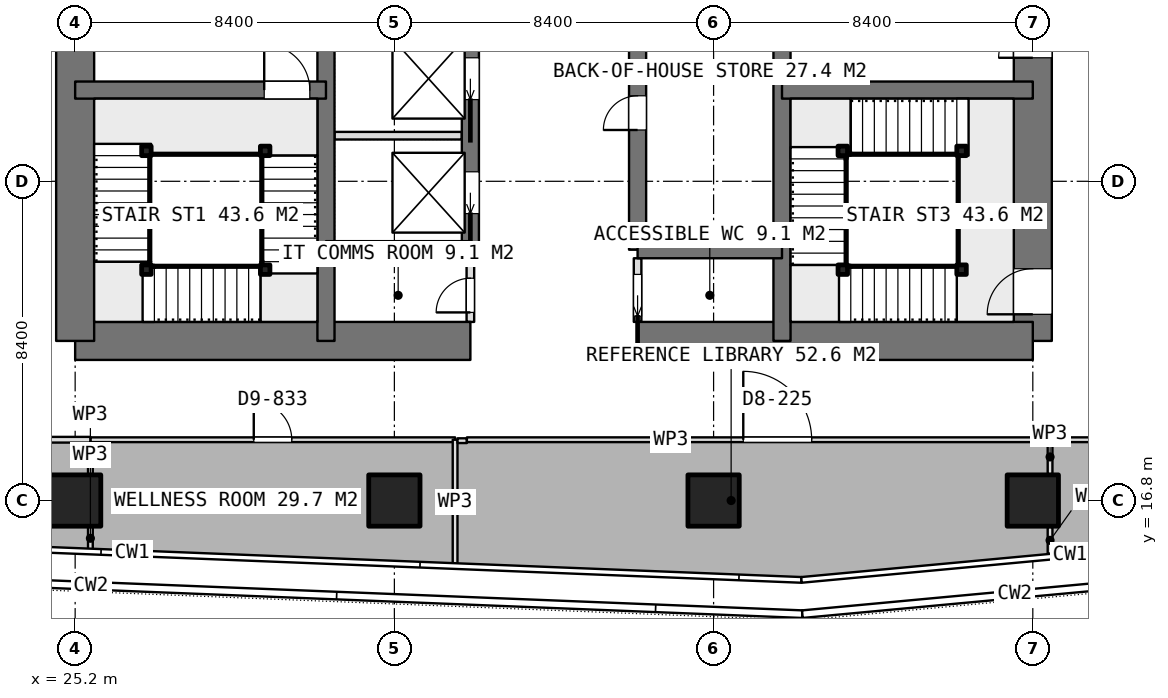
"""IFC4 building model, lengths in metres.
Left out: names, types, materials, properties, quantities, classifications, styles, units other than length and angle.
Written with IfcOpenShell. Run it as: python <this file> out.ifc"""

import sys

from ifc_helpers import new_model, si_unit, direction, frame, frame_2d, origin, origin_2d, place, context, subcontext, project, spatial, rectangle, extrude, element, fill, save


model = new_model("IFC4")
c1 = context("Model", 3, precision=1e-05, world=origin(), true_north=direction((0.0, 1.0)))
c2 = subcontext(c1, "Body", "Model", "MODEL_VIEW")
j1 = project(units=[si_unit("LENGTHUNIT", "METRE"), si_unit("PLANEANGLEUNIT", "RADIAN")], contexts=[c1])
p1 = place(None, origin())
s1 = spatial("IfcSite", under=j1, at=p1, CompositionType="ELEMENT")
p2 = place(p1, origin())
s2 = spatial("IfcBuilding", under=s1, at=p2, CompositionType="ELEMENT")
p3 = place(p2, frame((0.0, 0.0, 206.45)))
s3 = spatial("IfcBuildingStorey", under=s2, at=p3, CompositionType="ELEMENT", Elevation=206.45)
p4 = place(p3, frame((25.2, 21.0, 0.0), z_axis=(0.0, 0.0, 1.0), x_axis=(1.0, 0.0, 0.0)))
e1 = element("IfcWall", 1, at=p4, inside=s3, PredefinedType="SHEAR", context=c2, shape_type="SweptSolid", body=[
    extrude(rectangle(XDim=10.4, YDim=1.0, at=frame_2d((5.2, 0.0))), origin(), (0.0, 0.0, 1.0), 3.75),
])
p5 = place(p3, frame((40.0, 21.0, 0.0), z_axis=(0.0, 0.0, 1.0), x_axis=(1.0, 0.0, 0.0)))
e2 = element("IfcWall", 2, at=p5, inside=s3, PredefinedType="SHEAR", context=c2, shape_type="SweptSolid", body=[
    extrude(rectangle(XDim=10.4, YDim=1.0, at=frame_2d((5.2, 0.0))), origin(), (0.0, 0.0, 1.0), 3.75),
])
p6 = place(p3, frame((25.2, 21.0, 0.0), z_axis=(0.0, 0.0, 1.0), x_axis=(0.0, 1.0, 0.0)))
e3 = element("IfcWall", 3, at=p6, inside=s3, PredefinedType="SHEAR", context=c2, shape_type="SweptSolid", body=[
    extrude(rectangle(XDim=25.2, YDim=1.0, at=frame_2d((12.6, 0.0))), origin(), (0.0, 0.0, 1.0), 3.75),
])
p7 = place(p6, frame((7.8, 0.0, 0.0)))
e4 = element("IfcOpeningElement", 4, at=p7, cuts=e3, PredefinedType="OPENING", context=c2, shape_type="SweptSolid", body=[
    extrude(rectangle(XDim=1.2, YDim=2.1, at=frame_2d((0.6, 1.05))), frame((0.0, 0.51, 0.0), z_axis=(0.0, -1.0, 0.0), x_axis=(1.0, 0.0, 0.0)), (0.0, 0.0, 1.0), 1.02),
])
p8 = place(p6, frame((14.25, 0.0, 0.0)))
e5 = element("IfcOpeningElement", 5, at=p8, cuts=e3, PredefinedType="OPENING", context=c2, shape_type="SweptSolid", body=[
    extrude(rectangle(XDim=0.9, YDim=2.1, at=frame_2d((0.45, 1.05))), frame((0.0, 0.51, 0.0), z_axis=(0.0, -1.0, 0.0), x_axis=(1.0, 0.0, 0.0)), (0.0, 0.0, 1.0), 1.02),
])
p9 = place(p6, frame((16.85, 0.0, 0.0)))
e6 = element("IfcOpeningElement", 6, at=p9, cuts=e3, PredefinedType="OPENING", context=c2, shape_type="SweptSolid", body=[
    extrude(rectangle(XDim=0.9, YDim=2.1, at=frame_2d((0.45, 1.05))), frame((0.0, 0.51, 0.0), z_axis=(0.0, -1.0, 0.0), x_axis=(1.0, 0.0, 0.0)), (0.0, 0.0, 1.0), 1.02),
])
p10 = place(p6, frame((19.025, 0.0, 0.0)))
e7 = element("IfcOpeningElement", 7, at=p10, cuts=e3, PredefinedType="OPENING", context=c2, shape_type="SweptSolid", body=[
    extrude(rectangle(XDim=1.2, YDim=2.1, at=frame_2d((0.6, 1.05))), frame((0.0, 0.51, 0.0), z_axis=(0.0, -1.0, 0.0), x_axis=(1.0, 0.0, 0.0)), (0.0, 0.0, 1.0), 1.02),
])
p11 = place(p3, frame((50.4, 21.0, 0.0), z_axis=(0.0, 0.0, 1.0), x_axis=(0.0, 1.0, 0.0)))
e8 = element("IfcWall", 8, at=p11, inside=s3, PredefinedType="SHEAR", context=c2, shape_type="SweptSolid", body=[
    extrude(rectangle(XDim=25.2, YDim=1.0, at=frame_2d((12.6, 0.0))), origin(), (0.0, 0.0, 1.0), 3.75),
])
p12 = place(p11, frame((16.2, 0.0, 0.0)))
e9 = element("IfcOpeningElement", 9, at=p12, cuts=e8, PredefinedType="OPENING", context=c2, shape_type="SweptSolid", body=[
    extrude(rectangle(XDim=1.2, YDim=2.1, at=frame_2d((0.6, 1.05))), frame((0.0, 0.51, 0.0), z_axis=(0.0, -1.0, 0.0), x_axis=(1.0, 0.0, 0.0)), (0.0, 0.0, 1.0), 1.02),
])
p13 = place(p11, frame((10.05, 0.0, 0.0)))
e10 = element("IfcOpeningElement", 10, at=p13, cuts=e8, PredefinedType="OPENING", context=c2, shape_type="SweptSolid", body=[
    extrude(rectangle(XDim=0.9, YDim=2.1, at=frame_2d((0.45, 1.05))), frame((0.0, 0.51, 0.0), z_axis=(0.0, -1.0, 0.0), x_axis=(1.0, 0.0, 0.0)), (0.0, 0.0, 1.0), 1.02),
])
p14 = place(p11, frame((7.45, 0.0, 0.0)))
e11 = element("IfcOpeningElement", 11, at=p14, cuts=e8, PredefinedType="OPENING", context=c2, shape_type="SweptSolid", body=[
    extrude(rectangle(XDim=0.9, YDim=2.1, at=frame_2d((0.45, 1.05))), frame((0.0, 0.51, 0.0), z_axis=(0.0, -1.0, 0.0), x_axis=(1.0, 0.0, 0.0)), (0.0, 0.0, 1.0), 1.02),
])
p15 = place(p11, frame((0.7, 0.0, 0.0)))
e12 = element("IfcOpeningElement", 12, at=p15, cuts=e8, PredefinedType="OPENING", context=c2, shape_type="SweptSolid", body=[
    extrude(rectangle(XDim=1.2, YDim=2.1, at=frame_2d((0.6, 1.05))), frame((0.0, 0.51, 0.0), z_axis=(0.0, -1.0, 0.0), x_axis=(1.0, 0.0, 0.0)), (0.0, 0.0, 1.0), 1.02),
])
for number, where, z_axis, x_axis in (
    (13, (31.8, 21.0, 0.0), (0.0, 0.0, 1.0), (0.0, 1.0, 0.0)),
    (14, (43.8, 21.0, 0.0), (0.0, 0.0, 1.0), (0.0, 1.0, 0.0)),
):
    element("IfcWall", number, at=place(p3, frame(where, z_axis=z_axis, x_axis=x_axis)), inside=s3, PredefinedType="SHEAR", context=c2, shape_type="SweptSolid", body=[
        extrude(rectangle(XDim=25.2, YDim=0.45, at=frame_2d((12.6, 0.0))), origin(), (0.0, 0.0, 1.0), 3.75),
    ])
p16 = place(p3, frame((35.6, 23.4, 0.0), z_axis=(0.0, 0.0, 1.0), x_axis=(0.0, 1.0, 0.0)))
e15 = element("IfcWall", 15, at=p16, inside=s3, PredefinedType="SHEAR", context=c2, shape_type="SweptSolid", body=[
    extrude(rectangle(XDim=18.0, YDim=0.45, at=frame_2d((9.0, 0.0))), origin(), (0.0, 0.0, 1.0), 3.75),
])
p17 = place(p16, frame((0.95, 0.0, 0.0)))
e16 = element("IfcOpeningElement", 16, at=p17, cuts=e15, PredefinedType="OPENING", context=c2, shape_type="SweptSolid", body=[
    extrude(rectangle(XDim=1.1, YDim=2.1, at=frame_2d((0.55, 1.05))), frame((0.0, 0.235, 0.0), z_axis=(0.0, -1.0, 0.0), x_axis=(1.0, 0.0, 0.0)), (0.0, 0.0, 1.0), 0.47),
])
p18 = place(p16, frame((3.95, 0.0, 0.0)))
e17 = element("IfcOpeningElement", 17, at=p18, cuts=e15, PredefinedType="OPENING", context=c2, shape_type="SweptSolid", body=[
    extrude(rectangle(XDim=1.1, YDim=2.1, at=frame_2d((0.55, 1.05))), frame((0.0, 0.235, 0.0), z_axis=(0.0, -1.0, 0.0), x_axis=(1.0, 0.0, 0.0)), (0.0, 0.0, 1.0), 0.47),
])
p19 = place(p16, frame((6.95, 0.0, 0.0)))
e18 = element("IfcOpeningElement", 18, at=p19, cuts=e15, PredefinedType="OPENING", context=c2, shape_type="SweptSolid", body=[
    extrude(rectangle(XDim=1.1, YDim=2.1, at=frame_2d((0.55, 1.05))), frame((0.0, 0.235, 0.0), z_axis=(0.0, -1.0, 0.0), x_axis=(1.0, 0.0, 0.0)), (0.0, 0.0, 1.0), 0.47),
])
p20 = place(p16, frame((9.95, 0.0, 0.0)))
e19 = element("IfcOpeningElement", 19, at=p20, cuts=e15, PredefinedType="OPENING", context=c2, shape_type="SweptSolid", body=[
    extrude(rectangle(XDim=1.1, YDim=2.1, at=frame_2d((0.55, 1.05))), frame((0.0, 0.235, 0.0), z_axis=(0.0, -1.0, 0.0), x_axis=(1.0, 0.0, 0.0)), (0.0, 0.0, 1.0), 0.47),
])
p21 = place(p16, frame((12.95, 0.0, 0.0)))
e20 = element("IfcOpeningElement", 20, at=p21, cuts=e15, PredefinedType="OPENING", context=c2, shape_type="SweptSolid", body=[
    extrude(rectangle(XDim=1.1, YDim=2.1, at=frame_2d((0.55, 1.05))), frame((0.0, 0.235, 0.0), z_axis=(0.0, -1.0, 0.0), x_axis=(1.0, 0.0, 0.0)), (0.0, 0.0, 1.0), 0.47),
])
p22 = place(p16, frame((15.95, 0.0, 0.0)))
e21 = element("IfcOpeningElement", 21, at=p22, cuts=e15, PredefinedType="OPENING", context=c2, shape_type="SweptSolid", body=[
    extrude(rectangle(XDim=1.1, YDim=2.1, at=frame_2d((0.55, 1.05))), frame((0.0, 0.235, 0.0), z_axis=(0.0, -1.0, 0.0), x_axis=(1.0, 0.0, 0.0)), (0.0, 0.0, 1.0), 0.47),
])
p23 = place(p3, frame((40.0, 23.4, 0.0), z_axis=(0.0, 0.0, 1.0), x_axis=(0.0, 1.0, 0.0)))
e22 = element("IfcWall", 22, at=p23, inside=s3, PredefinedType="SHEAR", context=c2, shape_type="SweptSolid", body=[
    extrude(rectangle(XDim=18.0, YDim=0.45, at=frame_2d((9.0, 0.0))), origin(), (0.0, 0.0, 1.0), 3.75),
])
p24 = place(p23, frame((3.15, 0.0, 0.0)))
e23 = element("IfcOpeningElement", 23, at=p24, cuts=e22, PredefinedType="OPENING", context=c2, shape_type="SweptSolid", body=[
    extrude(rectangle(XDim=0.9, YDim=2.1, at=frame_2d((0.45, 1.05))), frame((0.0, 0.235, 0.0), z_axis=(0.0, -1.0, 0.0), x_axis=(1.0, 0.0, 0.0)), (0.0, 0.0, 1.0), 0.47),
])
p25 = place(p23, frame((9.15, 0.0, 0.0)))
e24 = element("IfcOpeningElement", 24, at=p25, cuts=e22, PredefinedType="OPENING", context=c2, shape_type="SweptSolid", body=[
    extrude(rectangle(XDim=0.9, YDim=2.1, at=frame_2d((0.45, 1.05))), frame((0.0, 0.235, 0.0), z_axis=(0.0, -1.0, 0.0), x_axis=(1.0, 0.0, 0.0)), (0.0, 0.0, 1.0), 0.47),
])
for number, where, z_axis, x_axis in (
    (25, (31.8, 23.4, 0.0), (0.0, 0.0, 1.0), (1.0, 0.0, 0.0)),
    (26, (40.0, 23.4, 0.0), (0.0, 0.0, 1.0), (1.0, 0.0, 0.0)),
):
    element("IfcWall", number, at=place(p3, frame(where, z_axis=z_axis, x_axis=x_axis)), inside=s3, PredefinedType="SHEAR", context=c2, shape_type="SweptSolid", body=[
        extrude(rectangle(XDim=3.8, YDim=0.45, at=frame_2d((1.9, 0.0))), origin(), (0.0, 0.0, 1.0), 3.75),
    ])
p26 = place(p3, frame((25.2, 27.6, 0.0), z_axis=(0.0, 0.0, 1.0), x_axis=(1.0, 0.0, 0.0)))
e27 = element("IfcWall", 27, at=p26, inside=s3, PredefinedType="SHEAR", context=c2, shape_type="SweptSolid", body=[
    extrude(rectangle(XDim=6.6, YDim=0.45, at=frame_2d((3.3, 0.0))), origin(), (0.0, 0.0, 1.0), 3.75),
])
p27 = place(p26, frame((4.975, 0.0, 0.0)))
e28 = element("IfcOpeningElement", 28, at=p27, cuts=e27, PredefinedType="OPENING", context=c2, shape_type="SweptSolid", body=[
    extrude(rectangle(XDim=1.2, YDim=2.1, at=frame_2d((0.6, 1.05))), frame((0.0, 0.235, 0.0), z_axis=(0.0, -1.0, 0.0), x_axis=(1.0, 0.0, 0.0)), (0.0, 0.0, 1.0), 0.47),
])
p28 = place(p3, frame((43.8, 27.6, 0.0), z_axis=(0.0, 0.0, 1.0), x_axis=(1.0, 0.0, 0.0)))
e29 = element("IfcWall", 29, at=p28, inside=s3, PredefinedType="SHEAR", context=c2, shape_type="SweptSolid", body=[
    extrude(rectangle(XDim=6.6, YDim=0.45, at=frame_2d((3.3, 0.0))), origin(), (0.0, 0.0, 1.0), 3.75),
])
for number, where, z_axis, x_axis in (
    (30, (25.2, 16.8, 0.0), (0.0, 0.0, 1.0), (1.0, 0.0, 0.0)),
    (31, (33.6, 16.8, 0.0), (0.0, 0.0, 1.0), (1.0, 0.0, 0.0)),
    (32, (42.0, 16.8, 0.0), (0.0, 0.0, 1.0), (1.0, 0.0, 0.0)),
    (33, (50.4, 16.8, 0.0), (0.0, 0.0, 1.0), (1.0, 0.0, 0.0)),
):
    element("IfcColumn", number, at=place(p3, frame(where, z_axis=z_axis, x_axis=x_axis)), inside=s3, PredefinedType="COLUMN", context=c2, shape_type="SweptSolid", body=[
        extrude(rectangle(XDim=1.35, YDim=1.35, at=origin_2d()), origin(), (0.0, 0.0, 1.0), 3.75),
    ])
p29 = place(p3, frame((32.025, 26.4, 0.0), z_axis=(0.0, 0.0, 1.0), x_axis=(1.0, 0.0, 0.0)))
e34 = element("IfcWall", 34, at=p29, inside=s3, PredefinedType="PARTITIONING", context=c2, shape_type="SweptSolid", body=[
    extrude(rectangle(XDim=3.35, YDim=0.2, at=frame_2d((1.675, 0.0))), origin(), (0.0, 0.0, 1.0), 3.5),
])
p30 = place(p3, frame((40.0, 21.5, 0.0), z_axis=(0.0, 0.0, 1.0), x_axis=(0.0, 1.0, 0.0)))
e35 = element("IfcWall", 35, at=p30, inside=s3, PredefinedType="PARTITIONING", context=c2, shape_type="SweptSolid", body=[
    extrude(rectangle(XDim=1.675, YDim=0.2, at=frame_2d((0.837, 0.0))), origin(), (0.0, 0.0, 1.0), 3.5),
])
p31 = place(p30, frame((0.15, 0.0, 0.0)))
e36 = element("IfcOpeningElement", 36, at=p31, cuts=e35, PredefinedType="OPENING", context=c2, shape_type="SweptSolid", body=[
    extrude(rectangle(XDim=1.1, YDim=2.1, at=frame_2d((0.55, 1.05))), frame((0.0, 0.11, 0.0), z_axis=(0.0, -1.0, 0.0), x_axis=(1.0, 0.0, 0.0)), (0.0, 0.0, 1.0), 0.22),
])
p32 = place(p3, frame((35.6, 21.5, 0.0), z_axis=(0.0, 0.0, 1.0), x_axis=(0.0, 1.0, 0.0)))
e37 = element("IfcWall", 37, at=p32, inside=s3, PredefinedType="PARTITIONING", context=c2, shape_type="SweptSolid", body=[
    extrude(rectangle(XDim=1.675, YDim=0.2, at=frame_2d((0.837, 0.0))), origin(), (0.0, 0.0, 1.0), 3.5),
])
p33 = place(p32, frame((0.25, 0.0, 0.0)))
e38 = element("IfcOpeningElement", 38, at=p33, cuts=e37, PredefinedType="OPENING", context=c2, shape_type="SweptSolid", body=[
    extrude(rectangle(XDim=0.9, YDim=2.1, at=frame_2d((0.45, 1.05))), frame((0.0, 0.11, 0.0), z_axis=(0.0, -1.0, 0.0), x_axis=(1.0, 0.0, 0.0)), (0.0, 0.0, 1.0), 0.22),
])
p34 = place(p3, frame((50.854, 15.401, 0.0), z_axis=(0.0, 0.0, 1.0), x_axis=(0.0, 1.0, 0.0)))
e39 = element("IfcWall", 39, at=p34, inside=s3, PredefinedType="PARTITIONING", context=c2, shape_type="SweptSolid", body=[
    extrude(rectangle(XDim=0.704, YDim=0.125, at=frame_2d((0.352, 0.0))), origin(), (0.0, 0.0, 1.0), 3.5),
])
p35 = place(p3, frame((50.854, 17.495, 0.0), z_axis=(0.0, 0.0, 1.0), x_axis=(0.0, 1.0, 0.0)))
e40 = element("IfcWall", 40, at=p35, inside=s3, PredefinedType="PARTITIONING", context=c2, shape_type="SweptSolid", body=[
    extrude(rectangle(XDim=0.905, YDim=0.125, at=frame_2d((0.452, 0.0))), origin(), (0.0, 0.0, 1.0), 3.5),
])
p36 = place(p3, frame((50.854, 18.4, 0.0), z_axis=(0.0, 0.0, 1.0), x_axis=(1.0, 0.0, 0.0)))
e41 = element("IfcWall", 41, at=p36, inside=s3, PredefinedType="PARTITIONING", context=c2, shape_type="SweptSolid", body=[
    extrude(rectangle(XDim=5.546, YDim=0.125, at=frame_2d((2.773, 0.0))), origin(), (0.0, 0.0, 1.0), 3.5),
])
p37 = place(p36, frame((2.273, 0.0, 0.0)))
e42 = element("IfcOpeningElement", 42, at=p37, cuts=e41, PredefinedType="OPENING", context=c2, shape_type="SweptSolid", body=[
    extrude(rectangle(XDim=1.0, YDim=2.1, at=frame_2d((0.5, 1.05))), frame((0.0, 0.073, 0.0), z_axis=(0.0, -1.0, 0.0), x_axis=(1.0, 0.0, 0.0)), (0.0, 0.0, 1.0), 0.145),
])
p38 = place(p3, frame((25.601, 15.509, 0.0), z_axis=(0.0, 0.0, 1.0), x_axis=(0.0, 1.0, 0.0)))
e43 = element("IfcWall", 43, at=p38, inside=s3, PredefinedType="PARTITIONING", context=c2, shape_type="SweptSolid", body=[
    extrude(rectangle(XDim=0.596, YDim=0.125, at=frame_2d((0.298, 0.0))), origin(), (0.0, 0.0, 1.0), 3.5),
])
p39 = place(p3, frame((25.601, 17.495, 0.0), z_axis=(0.0, 0.0, 1.0), x_axis=(0.0, 1.0, 0.0)))
e44 = element("IfcWall", 44, at=p39, inside=s3, PredefinedType="PARTITIONING", context=c2, shape_type="SweptSolid", body=[
    extrude(rectangle(XDim=0.905, YDim=0.125, at=frame_2d((0.452, 0.0))), origin(), (0.0, 0.0, 1.0), 3.5),
])
p40 = place(p3, frame((25.601, 18.4, 0.0), z_axis=(0.0, 0.0, 1.0), x_axis=(1.0, 0.0, 0.0)))
e45 = element("IfcWall", 45, at=p40, inside=s3, PredefinedType="PARTITIONING", context=c2, shape_type="SweptSolid", body=[
    extrude(rectangle(XDim=9.597, YDim=0.125, at=frame_2d((4.798, 0.0))), origin(), (0.0, 0.0, 1.0), 3.5),
])
p41 = place(p40, frame((4.299, 0.0, 0.0)))
e46 = element("IfcOpeningElement", 46, at=p41, cuts=e45, PredefinedType="OPENING", context=c2, shape_type="SweptSolid", body=[
    extrude(rectangle(XDim=1.0, YDim=2.1, at=frame_2d((0.5, 1.05))), frame((0.0, 0.073, 0.0), z_axis=(0.0, -1.0, 0.0), x_axis=(1.0, 0.0, 0.0)), (0.0, 0.0, 1.0), 0.145),
])
p42 = place(p3, frame((35.198, 18.4, 0.0), z_axis=(0.0, 0.0, 1.0), x_axis=(0.0, -1.0, 0.0)))
e47 = element("IfcWall", 47, at=p42, inside=s3, PredefinedType="PARTITIONING", context=c2, shape_type="SweptSolid", body=[
    extrude(rectangle(XDim=3.274, YDim=0.125, at=frame_2d((1.637, 0.0))), origin(), (0.0, 0.0, 1.0), 3.5),
])
p43 = place(p3, frame((22.4, 18.4, 0.0), z_axis=(0.0, 0.0, 1.0), x_axis=(1.0, 0.0, 0.0)))
e48 = element("IfcWall", 48, at=p43, inside=s3, PredefinedType="PARTITIONING", context=c2, shape_type="SweptSolid", body=[
    extrude(rectangle(XDim=3.201, YDim=0.15, at=frame_2d((1.601, 0.0))), origin(), (0.0, 0.0, 1.0), 3.5),
])
p44 = place(p3, frame((35.261, 18.375, 0.0), z_axis=(0.0, 0.0, 1.0), x_axis=(1.0, 0.0, 0.0)))
e49 = element("IfcWall", 49, at=p44, inside=s3, PredefinedType="PARTITIONING", context=c2, shape_type="SweptSolid", body=[
    extrude(rectangle(XDim=0.247, YDim=0.125, at=frame_2d((0.124, 0.0))), origin(), (0.0, 0.0, 1.0), 3.5),
])
p45 = place(p3, frame((35.508, 18.4, 0.0), z_axis=(0.0, 0.0, 1.0), x_axis=(1.0, 0.0, 0.0)))
e50 = element("IfcWall", 50, at=p45, inside=s3, PredefinedType="PARTITIONING", context=c2, shape_type="SweptSolid", body=[
    extrude(rectangle(XDim=15.346, YDim=0.125, at=frame_2d((7.673, 0.0))), origin(), (0.0, 0.0, 1.0), 3.5),
])
p46 = place(p45, frame((7.273, 0.0, 0.0)))
e51 = element("IfcOpeningElement", 51, at=p46, cuts=e50, PredefinedType="OPENING", context=c2, shape_type="SweptSolid", body=[
    extrude(rectangle(XDim=1.8, YDim=2.1, at=frame_2d((0.9, 1.05))), frame((0.0, 0.073, 0.0), z_axis=(0.0, -1.0, 0.0), x_axis=(1.0, 0.0, 0.0)), (0.0, 0.0, 1.0), 0.145),
])
for number, where, z_axis, x_axis in (
    (52, (30.2, 26.0, 0.0), (0.0, 0.0, 1.0), (1.0, 0.0, 0.0)),
    (53, (30.2, 22.875, 0.0), (0.0, 0.0, 1.0), (1.0, 0.0, 0.0)),
    (54, (27.075, 22.875, 0.0), (0.0, 0.0, 1.0), (1.0, 0.0, 0.0)),
    (55, (27.075, 26.0, 0.0), (0.0, 0.0, 1.0), (1.0, 0.0, 0.0)),
    (56, (48.525, 22.875, 0.0), (0.0, 0.0, 1.0), (1.0, 0.0, 0.0)),
    (57, (45.4, 22.875, 0.0), (0.0, 0.0, 1.0), (1.0, 0.0, 0.0)),
    (58, (45.4, 26.0, 0.0), (0.0, 0.0, 1.0), (1.0, 0.0, 0.0)),
    (59, (48.525, 26.0, 0.0), (0.0, 0.0, 1.0), (1.0, 0.0, 0.0)),
):
    element("IfcColumn", number, at=place(p3, frame(where, z_axis=z_axis, x_axis=x_axis)), inside=s3, PredefinedType="COLUMN", context=c2, shape_type="SweptSolid", body=[
        extrude(rectangle(XDim=0.25, YDim=0.25, at=origin_2d()), origin(), (0.0, 0.0, 1.0), 3.75),
    ])
p47 = place(p14, origin())
e60 = element("IfcDoor", 60, at=p47, inside=s3, OperationType="SINGLE_SWING_LEFT", PredefinedType="DOOR", context=c2, shape_type="SweptSolid", body=[
    extrude(rectangle(XDim=0.9, YDim=2.1, at=frame_2d((0.45, 1.05))), frame((0.0, 0.025, 0.0), z_axis=(0.0, -1.0, 0.0), x_axis=(1.0, 0.0, 0.0)), (0.0, 0.0, 1.0), 0.05),
])
fill(e11, e60)
p48 = place(p31, origin())
e61 = element("IfcDoor", 61, at=p48, inside=s3, OperationType="SLIDING_TO_LEFT", PredefinedType="DOOR", context=c2, shape_type="SweptSolid", body=[
    extrude(rectangle(XDim=1.1, YDim=2.1, at=frame_2d((0.55, 1.05))), frame((0.0, 0.025, 0.0), z_axis=(0.0, -1.0, 0.0), x_axis=(1.0, 0.0, 0.0)), (0.0, 0.0, 1.0), 0.05),
])
fill(e36, e61)
p49 = place(p33, origin())
e62 = element("IfcDoor", 62, at=p49, inside=s3, OperationType="SINGLE_SWING_LEFT", PredefinedType="DOOR", context=c2, shape_type="SweptSolid", body=[
    extrude(rectangle(XDim=0.9, YDim=2.1, at=frame_2d((0.45, 1.05))), frame((0.0, 0.025, 0.0), z_axis=(0.0, -1.0, 0.0), x_axis=(1.0, 0.0, 0.0)), (0.0, 0.0, 1.0), 0.05),
])
fill(e38, e62)
p50 = place(p24, origin())
e63 = element("IfcDoor", 63, at=p50, inside=s3, OperationType="SINGLE_SWING_LEFT", PredefinedType="DOOR", context=c2, shape_type="SweptSolid", body=[
    extrude(rectangle(XDim=0.9, YDim=2.1, at=frame_2d((0.45, 1.05))), frame((0.0, 0.025, 0.0), z_axis=(0.0, -1.0, 0.0), x_axis=(1.0, 0.0, 0.0)), (0.0, 0.0, 1.0), 0.05),
])
fill(e23, e63)
p51 = place(p17, origin())
e64 = element("IfcDoor", 64, at=p51, inside=s3, OperationType="SLIDING_TO_LEFT", PredefinedType="USERDEFINED", context=c2, shape_type="SweptSolid", body=[
    extrude(rectangle(XDim=1.1, YDim=2.1, at=frame_2d((0.55, 1.05))), frame((0.0, 0.025, 0.0), z_axis=(0.0, -1.0, 0.0), x_axis=(1.0, 0.0, 0.0)), (0.0, 0.0, 1.0), 0.05),
])
fill(e16, e64)
p52 = place(p18, origin())
e65 = element("IfcDoor", 65, at=p52, inside=s3, OperationType="SLIDING_TO_LEFT", PredefinedType="USERDEFINED", context=c2, shape_type="SweptSolid", body=[
    extrude(rectangle(XDim=1.1, YDim=2.1, at=frame_2d((0.55, 1.05))), frame((0.0, 0.025, 0.0), z_axis=(0.0, -1.0, 0.0), x_axis=(1.0, 0.0, 0.0)), (0.0, 0.0, 1.0), 0.05),
])
fill(e17, e65)
p53 = place(p41, origin())
e66 = element("IfcDoor", 66, at=p53, inside=s3, OperationType="SINGLE_SWING_LEFT", PredefinedType="DOOR", context=c2, shape_type="SweptSolid", body=[
    extrude(rectangle(XDim=1.0, YDim=2.1, at=frame_2d((0.5, 1.05))), frame((0.0, 0.025, 0.0), z_axis=(0.0, -1.0, 0.0), x_axis=(1.0, 0.0, 0.0)), (0.0, 0.0, 1.0), 0.05),
])
fill(e46, e66)
p54 = place(p46, origin())
e67 = element("IfcDoor", 67, at=p54, inside=s3, OperationType="DOUBLE_DOOR_SINGLE_SWING", PredefinedType="DOOR", context=c2, shape_type="SweptSolid", body=[
    extrude(rectangle(XDim=1.8, YDim=2.1, at=frame_2d((0.9, 1.05))), frame((0.0, 0.025, 0.0), z_axis=(0.0, -1.0, 0.0), x_axis=(1.0, 0.0, 0.0)), (0.0, 0.0, 1.0), 0.05),
])
fill(e51, e67)
p55 = place(p27, origin())
e68 = element("IfcDoor", 68, at=p55, inside=s3, OperationType="SINGLE_SWING_RIGHT", PredefinedType="DOOR", context=c2, shape_type="SweptSolid", body=[
    extrude(rectangle(XDim=1.2, YDim=2.1, at=frame_2d((0.6, 1.05))), frame((0.0, 0.025, 0.0), z_axis=(0.0, -1.0, 0.0), x_axis=(1.0, 0.0, 0.0)), (0.0, 0.0, 1.0), 0.05),
])
fill(e28, e68)
p56 = place(p15, origin())
e69 = element("IfcDoor", 69, at=p56, inside=s3, OperationType="SINGLE_SWING_RIGHT", PredefinedType="DOOR", context=c2, shape_type="SweptSolid", body=[
    extrude(rectangle(XDim=1.2, YDim=2.1, at=frame_2d((0.6, 1.05))), frame((0.0, 0.025, 0.0), z_axis=(0.0, -1.0, 0.0), x_axis=(1.0, 0.0, 0.0)), (0.0, 0.0, 1.0), 0.05),
])
fill(e12, e69)
save(model, sys.argv[1])
